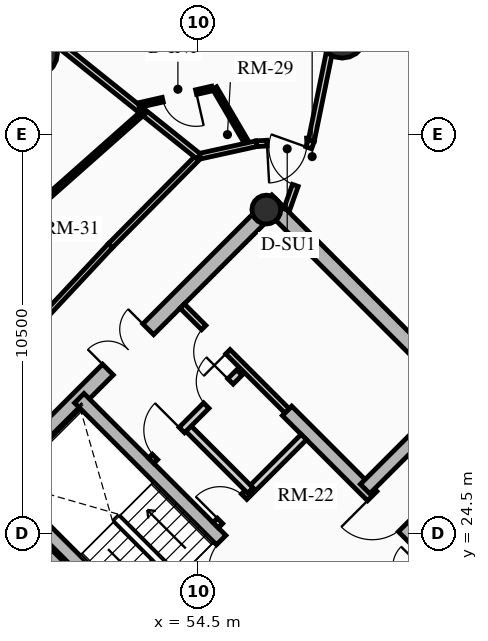
"""IFC4 building model, lengths in metres.
Left out: names, types, materials, properties, quantities, classifications, styles, units other than length and angle.
Written with IfcOpenShell. Run it as: python <this file> out.ifc"""

import sys

from ifc_helpers import new_model, si_unit, direction, frame, frame_2d, origin, origin_2d, place, context, subcontext, project, spatial, rectangle, circle, hollow_circle, extrude, source, transform, mapped, element, fill, save


model = new_model("IFC4")
c1 = context("Model", 3, precision=1e-05, world=origin(), true_north=direction((0.0, 1.0)))
c2 = subcontext(c1, "Body", "Model", "MODEL_VIEW")
j1 = project(units=[si_unit("LENGTHUNIT", "METRE"), si_unit("PLANEANGLEUNIT", "RADIAN")], contexts=[c1])
p1 = place(None, origin())
s1 = spatial("IfcSite", under=j1, at=p1, CompositionType="ELEMENT")
p2 = place(p1, origin())
s2 = spatial("IfcBuilding", under=s1, at=p2, CompositionType="ELEMENT")
p3 = place(p2, frame((0.0, 0.0, 174.88)))
s3 = spatial("IfcBuildingStorey", under=s2, at=p3, CompositionType="ELEMENT", Elevation=174.88)
for number, where, z_axis, x_axis in (
    (1, (58.702, 15.732, 0.0), (0.0, 0.0, 1.0), (-0.707, 0.707, 0.0)),
    (2, (66.268, 23.298, 0.0), (0.0, 0.0, 1.0), (-0.707, 0.707, 0.0)),
):
    element("IfcWall", number, at=place(p3, frame(where, z_axis=z_axis, x_axis=x_axis)), inside=s3, PredefinedType="SHEAR", context=c2, shape_type="SweptSolid", body=[
        extrude(rectangle(XDim=14.1, YDim=0.4, at=frame_2d((7.05, 0.0))), origin(), (0.0, 0.0, 1.0), 2.91),
    ])
p4 = place(p3, frame((48.873, 25.561, 0.0), z_axis=(0.0, 0.0, 1.0), x_axis=(0.707106781187, 0.707106781187, 0.0)))
e3 = element("IfcWall", 3, at=p4, inside=s3, PredefinedType="SHEAR", context=c2, shape_type="SweptSolid", body=[
    extrude(rectangle(XDim=10.7, YDim=0.4, at=frame_2d((5.35, 0.0))), origin(), (0.0, 0.0, 1.0), 2.91),
])
m1 = source(origin(), c2, "Body", "SweptSolid", [
    extrude(rectangle(XDim=1.5, YDim=2.02, at=frame_2d((0.75, 1.01))), frame((0.0, 0.21, 0.0), z_axis=(0.0, -1.0, 0.0), x_axis=(1.0, 0.0, 0.0)), (0.0, 0.0, 1.0), 0.42),
])
p5 = place(p4, frame((4.6, 0.0, 0.0)))
e4 = element("IfcOpeningElement", 4, at=p5, cuts=e3, PredefinedType="OPENING", context=c2, shape_type="MappedRepresentation", body=[
    mapped(m1, transform((0.0, 0.0, 0.0), x_axis=(1.0, 0.0, 0.0), y_axis=(0.0, 1.0, 0.0), z_axis=(0.0, 0.0, 1.0), scale=1.0)),
])
p6 = place(p3, frame((61.06, 18.373, 0.0), z_axis=(0.0, 0.0, 1.0), x_axis=(-0.707106781187, 0.707106781187, 0.0)))
e5 = element("IfcWall", 5, at=p6, inside=s3, PredefinedType="SHEAR", context=c2, shape_type="SweptSolid", body=[
    extrude(rectangle(XDim=13.7, YDim=0.35, at=frame_2d((6.85, 0.0))), origin(), (0.0, 0.0, 1.0), 2.91),
])
m2 = source(origin(), c2, "Body", "SweptSolid", [
    extrude(rectangle(XDim=1.1, YDim=2.015, at=frame_2d((0.55, 1.007))), frame((0.0, 0.185, 0.0), z_axis=(0.0, -1.0, 0.0), x_axis=(1.0, 0.0, 0.0)), (0.0, 0.0, 1.0), 0.37),
])
p7 = place(p6, frame((4.85, 0.0, 0.0)))
e6 = element("IfcOpeningElement", 6, at=p7, cuts=e5, PredefinedType="OPENING", context=c2, shape_type="MappedRepresentation", body=[
    mapped(m2, transform((0.0, 0.0, 0.0), x_axis=(1.0, 0.0, 0.0), y_axis=(0.0, 1.0, 0.0), z_axis=(0.0, 0.0, 1.0), scale=1.0)),
])
p8 = place(p6, frame((0.625, 0.0, 0.0)))
e7 = element("IfcOpeningElement", 7, at=p8, cuts=e5, PredefinedType="OPENING", context=c2, shape_type="MappedRepresentation", body=[
    mapped(m2, transform((0.0, 0.0, 0.0), x_axis=(1.0, 0.0, 0.0), y_axis=(0.0, 1.0, 0.0), z_axis=(0.0, 0.0, 1.0), scale=1.0)),
])
p9 = place(p6, frame((2.625, 0.0, 0.0)))
e8 = element("IfcOpeningElement", 8, at=p9, cuts=e5, PredefinedType="OPENING", context=c2, shape_type="MappedRepresentation", body=[
    mapped(m2, transform((0.0, 0.0, 0.0), x_axis=(1.0, 0.0, 0.0), y_axis=(0.0, 1.0, 0.0), z_axis=(0.0, 0.0, 1.0), scale=1.0)),
])
m3 = source(origin(), c2, "Body", "SweptSolid", [
    extrude(rectangle(XDim=1.15, YDim=2.02, at=frame_2d((0.575, 1.01))), frame((0.0, 0.185, 0.0), z_axis=(0.0, -1.0, 0.0), x_axis=(1.0, 0.0, 0.0)), (0.0, 0.0, 1.0), 0.37),
])
p10 = place(p6, frame((7.27, 0.0, 0.0)))
e9 = element("IfcOpeningElement", 9, at=p10, cuts=e5, PredefinedType="OPENING", context=c2, shape_type="MappedRepresentation", body=[
    mapped(m3, transform((0.0, 0.0, 0.0), x_axis=(1.0, 0.0, 0.0), y_axis=(0.0, 1.0, 0.0), z_axis=(0.0, 0.0, 1.0), scale=1.0)),
])
p11 = place(p3, frame((63.627, 20.94, 0.0), z_axis=(0.0, 0.0, 1.0), x_axis=(-0.707119496762, 0.707094065383, 0.0)))
e10 = element("IfcWall", 10, at=p11, inside=s3, PredefinedType="SHEAR", context=c2, shape_type="SweptSolid", body=[
    extrude(rectangle(XDim=9.6, YDim=0.35, at=frame_2d((4.8, 0.0))), origin(), (0.0, 0.0, 1.0), 2.91),
])
p12 = place(p11, frame((5.28, 0.0, 0.0)))
e11 = element("IfcOpeningElement", 11, at=p12, cuts=e10, PredefinedType="OPENING", context=c2, shape_type="MappedRepresentation", body=[
    mapped(m3, transform((0.0, 0.0, 0.0), x_axis=(1.0, 0.0, 0.0), y_axis=(0.0, 1.0, 0.0), z_axis=(0.0, 0.0, 1.0), scale=1.0)),
])
p13 = place(p3, frame((53.922, 21.141, 0.0), z_axis=(0.0, 0.0, 1.0), x_axis=(-0.707106781187, 0.707106781187, 0.0)))
e12 = element("IfcWall", 12, at=p13, inside=s3, PredefinedType="SHEAR", context=c2, shape_type="SweptSolid", body=[
    extrude(rectangle(XDim=6.695, YDim=0.35, at=frame_2d((3.348, 0.0))), origin(), (0.0, 0.0, 1.0), 2.91),
])
p14 = place(p3, frame((58.893, 25.674, 0.0), z_axis=(0.0, 0.0, 1.0), x_axis=(0.707106781187, 0.707106781187, 0.0)))
e13 = element("IfcWall", 13, at=p14, inside=s3, PredefinedType="SHEAR", context=c2, shape_type="SweptSolid", body=[
    extrude(rectangle(XDim=3.285, YDim=0.35, at=frame_2d((1.643, 0.0))), origin(), (0.0, 0.0, 1.0), 2.91),
])
p15 = place(p3, frame((56.294, 33.024, 0.0), z_axis=(0.0, 0.0, 1.0), x_axis=(0.707106781187, 0.707106781187, 0.0)))
e14 = element("IfcColumn", 14, at=p15, inside=s3, PredefinedType="COLUMN", context=c2, shape_type="SweptSolid", body=[
    extrude(hollow_circle(Radius=0.38, WallThickness=0.032, at=origin_2d()), origin(), (0.0, 0.0, 1.0), 2.91),
])
for number, where, z_axis, x_axis in (
    (15, (58.291, 37.635, 0.0), (0.0, 0.0, 1.0), (1.0, 0.0, 0.0)),
    (16, (50.173, 37.146, 0.0), (0.0, 0.0, 1.0), (1.0, 0.0, 0.0)),
):
    element("IfcColumn", number, at=place(p3, frame(where, z_axis=z_axis, x_axis=x_axis)), inside=s3, PredefinedType="USERDEFINED", context=c2, shape_type="SweptSolid", body=[
        extrude(circle(Radius=0.625, at=origin_2d()), origin(), (0.0, 0.0, 1.0), 2.91),
    ])
p16 = place(p3, frame((58.214, 21.467, 0.0), z_axis=(0.0, 0.0, 1.0), x_axis=(0.707106781187, 0.707106781187, 0.0)))
e17 = element("IfcWall", 17, at=p16, inside=s3, PredefinedType="PARTITIONING", context=c2, shape_type="SweptSolid", body=[
    extrude(rectangle(XDim=3.28, YDim=0.2, at=frame_2d((1.64, 0.0))), origin(), (0.0, 0.0, 1.0), 2.675),
])
m4 = source(origin(), c2, "Body", "SweptSolid", [
    extrude(rectangle(XDim=1.5, YDim=2.02, at=frame_2d((0.75, 1.01))), frame((0.0, 0.11, 0.0), z_axis=(0.0, -1.0, 0.0), x_axis=(1.0, 0.0, 0.0)), (0.0, 0.0, 1.0), 0.22),
])
p17 = place(p16, frame((1.55, 0.0, 0.0)))
e18 = element("IfcOpeningElement", 18, at=p17, cuts=e17, PredefinedType="OPENING", context=c2, shape_type="MappedRepresentation", body=[
    mapped(m4, transform((0.0, 0.0, 0.0), x_axis=(1.0, 0.0, 0.0), y_axis=(0.0, 1.0, 0.0), z_axis=(0.0, 0.0, 1.0), scale=1.0)),
])
p18 = place(p3, frame((54.961, 24.719, 0.0), z_axis=(0.0, 0.0, 1.0), x_axis=(0.707106781187, 0.707106781187, 0.0)))
e19 = element("IfcWall", 19, at=p18, inside=s3, PredefinedType="PARTITIONING", context=c2, shape_type="SweptSolid", body=[
    extrude(rectangle(XDim=3.28, YDim=0.2, at=frame_2d((1.64, 0.0))), origin(), (0.0, 0.0, 1.0), 2.675),
])
m5 = source(origin(), c2, "Body", "SweptSolid", [
    extrude(rectangle(XDim=0.9, YDim=2.005, at=frame_2d((0.45, 1.002))), frame((0.0, 0.11, 0.0), z_axis=(0.0, -1.0, 0.0), x_axis=(1.0, 0.0, 0.0)), (0.0, 0.0, 1.0), 0.22),
])
p19 = place(p18, frame((0.16, 0.0, 0.0)))
e20 = element("IfcOpeningElement", 20, at=p19, cuts=e19, PredefinedType="OPENING", context=c2, shape_type="MappedRepresentation", body=[
    mapped(m5, transform((0.0, 0.0, 0.0), x_axis=(1.0, 0.0, 0.0), y_axis=(0.0, 1.0, 0.0), z_axis=(0.0, 0.0, 1.0), scale=1.0)),
])
p20 = place(p3, frame((55.874, 25.631, 0.0), z_axis=(0.0, 0.0, 1.0), x_axis=(-0.707157639372, 0.707055919343, 0.0)))
e21 = element("IfcWall", 21, at=p20, inside=s3, PredefinedType="PARTITIONING", context=c2, shape_type="SweptSolid", body=[
    extrude(rectangle(XDim=2.4, YDim=0.2, at=frame_2d((1.2, 0.0))), origin(), (0.0, 0.0, 1.0), 2.675),
])
p21 = place(p3, frame((53.264, 26.416, 0.0), z_axis=(0.0, 0.0, 1.0), x_axis=(0.707106781187, 0.707106781187, 0.0)))
e22 = element("IfcWall", 22, at=p21, inside=s3, PredefinedType="PARTITIONING", context=c2, shape_type="SweptSolid", body=[
    extrude(rectangle(XDim=3.28, YDim=0.2, at=frame_2d((1.64, 0.0))), origin(), (0.0, 0.0, 1.0), 2.675),
])
m6 = source(origin(), c2, "Body", "SweptSolid", [
    extrude(rectangle(XDim=1.0, YDim=2.015, at=frame_2d((0.5, 1.007))), frame((0.0, 0.11, 0.0), z_axis=(0.0, -1.0, 0.0), x_axis=(1.0, 0.0, 0.0)), (0.0, 0.0, 1.0), 0.22),
])
p22 = place(p21, frame((0.14, 0.0, 0.0)))
e23 = element("IfcOpeningElement", 23, at=p22, cuts=e22, PredefinedType="OPENING", context=c2, shape_type="MappedRepresentation", body=[
    mapped(m6, transform((0.0, 0.0, 0.0), x_axis=(1.0, 0.0, 0.0), y_axis=(0.0, 1.0, 0.0), z_axis=(0.0, 0.0, 1.0), scale=1.0)),
])
p23 = place(p21, frame((2.05, 0.0, 0.0)))
e24 = element("IfcOpeningElement", 24, at=p23, cuts=e22, PredefinedType="OPENING", context=c2, shape_type="MappedRepresentation", body=[
    mapped(m5, transform((0.0, 0.0, 0.0), x_axis=(1.0, 0.0, 0.0), y_axis=(0.0, 1.0, 0.0), z_axis=(0.0, 0.0, 1.0), scale=1.0)),
])
p24 = place(p3, frame((56.839, 27.728, 0.0), z_axis=(0.0, 0.0, 1.0), x_axis=(-0.707106781187, 0.707106781187, 0.0)))
e25 = element("IfcWall", 25, at=p24, inside=s3, PredefinedType="PARTITIONING", context=c2, shape_type="SweptSolid", body=[
    extrude(rectangle(XDim=3.9, YDim=0.16, at=frame_2d((1.95, 0.0))), origin(), (0.0, 0.0, 1.0), 2.675),
])
m7 = source(origin(), c2, "Body", "SweptSolid", [
    extrude(rectangle(XDim=0.9, YDim=2.005, at=frame_2d((0.45, 1.002))), frame((0.0, 0.09, 0.0), z_axis=(0.0, -1.0, 0.0), x_axis=(1.0, 0.0, 0.0)), (0.0, 0.0, 1.0), 0.18),
])
p25 = place(p24, frame((2.2, 0.0, 0.0)))
e26 = element("IfcOpeningElement", 26, at=p25, cuts=e25, PredefinedType="OPENING", context=c2, shape_type="MappedRepresentation", body=[
    mapped(m7, transform((0.0, 0.0, 0.0), x_axis=(1.0, 0.0, 0.0), y_axis=(0.0, 1.0, 0.0), z_axis=(0.0, 0.0, 1.0), scale=1.0)),
])
p26 = place(p3, frame((57.478, 34.838, 0.0), z_axis=(0.0, 0.0, 1.0), x_axis=(-0.998448388303, -0.05568497011, 0.0)))
e27 = element("IfcWall", 27, at=p26, inside=s3, PredefinedType="PARTITIONING", context=c2, shape_type="SweptSolid", body=[
    extrude(rectangle(XDim=1.447, YDim=0.15, at=frame_2d((0.723, 0.0))), origin(), (0.0, 0.0, 1.0), 2.245),
])
m8 = source(origin(), c2, "Body", "SweptSolid", [
    extrude(rectangle(XDim=1.05, YDim=2.015, at=frame_2d((0.525, 1.007))), frame((0.0, 0.085, 0.0), z_axis=(0.0, -1.0, 0.0), x_axis=(1.0, 0.0, 0.0)), (0.0, 0.0, 1.0), 0.17),
])
p27 = place(p26, frame((0.12, 0.0, 0.0)))
e28 = element("IfcOpeningElement", 28, at=p27, cuts=e27, PredefinedType="OPENING", context=c2, shape_type="MappedRepresentation", body=[
    mapped(m8, transform((0.0, 0.0, 0.0), x_axis=(1.0, 0.0, 0.0), y_axis=(0.0, 1.0, 0.0), z_axis=(0.0, 0.0, 1.0), scale=1.0)),
])
p28 = place(p3, frame((56.033, 34.757, 0.0), z_axis=(0.0, 0.0, 1.0), x_axis=(-0.976507263775, -0.215484486204, 0.0)))
e29 = element("IfcWall", 29, at=p28, inside=s3, PredefinedType="PARTITIONING", context=c2, shape_type="SweptSolid", body=[
    extrude(rectangle(XDim=1.556, YDim=0.15, at=frame_2d((0.778, 0.0))), origin(), (0.0, 0.0, 1.0), 2.245),
])
p29 = place(p3, frame((54.514, 34.422, 0.0), z_axis=(0.0, 0.0, 1.0), x_axis=(-0.703289573518, -0.710903492593, 0.0)))
e30 = element("IfcWall", 30, at=p29, inside=s3, PredefinedType="PARTITIONING", context=c2, shape_type="SweptSolid", body=[
    extrude(rectangle(XDim=3.303, YDim=0.15, at=frame_2d((1.651, 0.0))), origin(), (0.0, 0.0, 1.0), 2.245),
])
p30 = place(p3, frame((52.191, 32.074, 0.0), z_axis=(0.0, 0.0, 1.0), x_axis=(-0.682404362608, -0.730974887321, 0.0)))
e31 = element("IfcWall", 31, at=p30, inside=s3, PredefinedType="PARTITIONING", context=c2, shape_type="SweptSolid", body=[
    extrude(rectangle(XDim=6.364, YDim=0.15, at=frame_2d((3.182, 0.0))), origin(), (0.0, 0.0, 1.0), 2.245),
])
p31 = place(p3, frame((57.478, 34.838, 0.0), z_axis=(0.0, 0.0, 1.0), x_axis=(0.200272806445, 0.979740171167, 0.0)))
e32 = element("IfcWall", 32, at=p31, inside=s3, PredefinedType="PARTITIONING", context=c2, shape_type="SweptSolid", body=[
    extrude(rectangle(XDim=4.358, YDim=0.16, at=frame_2d((2.179, 0.0))), origin(), (0.0, 0.0, 1.0), 2.245),
])
p32 = place(p3, frame((54.514, 34.422, 0.0), z_axis=(0.0, 0.0, 1.0), x_axis=(-0.780385234796, 0.625299036712, 0.0)))
e33 = element("IfcWall", 33, at=p32, inside=s3, PredefinedType="PARTITIONING", context=c2, shape_type="SweptSolid", body=[
    extrude(rectangle(XDim=6.653, YDim=0.16, at=frame_2d((3.326, 0.0))), origin(), (0.0, 0.0, 1.0), 2.245),
])
p33 = place(p3, frame((56.828, 33.021, 0.0), z_axis=(0.0, 0.0, 1.0), x_axis=(0.336608838259, 0.941644566705, 0.0)))
e34 = element("IfcWall", 34, at=p33, inside=s3, PredefinedType="PARTITIONING", context=c2, shape_type="SweptSolid", body=[
    extrude(rectangle(XDim=1.93, YDim=0.16, at=frame_2d((0.965, 0.0))), origin(), (0.0, 0.0, 1.0), 2.245),
])
m9 = source(origin(), c2, "Body", "SweptSolid", [
    extrude(rectangle(XDim=1.05, YDim=2.015, at=frame_2d((0.525, 1.007))), frame((0.0, 0.09, 0.0), z_axis=(0.0, -1.0, 0.0), x_axis=(1.0, 0.0, 0.0)), (0.0, 0.0, 1.0), 0.18),
])
p34 = place(p33, frame((0.68, 0.0, 0.0)))
e35 = element("IfcOpeningElement", 35, at=p34, cuts=e34, PredefinedType="OPENING", context=c2, shape_type="MappedRepresentation", body=[
    mapped(m9, transform((0.0, 0.0, 0.0), x_axis=(1.0, 0.0, 0.0), y_axis=(0.0, 1.0, 0.0), z_axis=(0.0, 0.0, 1.0), scale=1.0)),
])
p35 = place(p3, frame((55.737, 34.853, 0.0), z_axis=(0.0, 0.0, 1.0), x_axis=(-0.506282425857, 0.862367732043, 0.0)))
e36 = element("IfcWall", 36, at=p35, inside=s3, PredefinedType="PARTITIONING", context=c2, shape_type="SweptSolid", body=[
    extrude(rectangle(XDim=1.591, YDim=0.125, at=frame_2d((0.796, 0.0))), origin(), (0.0, 0.0, 1.0), 2.245),
])
p36 = place(p3, frame((54.871, 36.211, 0.0), z_axis=(0.0, 0.0, 1.0), x_axis=(-0.975212623293, -0.221269833846, 0.0)))
e37 = element("IfcWall", 37, at=p36, inside=s3, PredefinedType="PARTITIONING", context=c2, shape_type="SweptSolid", body=[
    extrude(rectangle(XDim=1.983, YDim=0.125, at=frame_2d((0.991, 0.0))), origin(), (0.0, 0.0, 1.0), 2.312),
])
m10 = source(origin(), c2, "Body", "SweptSolid", [
    extrude(rectangle(XDim=0.9, YDim=2.005, at=frame_2d((0.45, 1.002))), frame((0.0, 0.073, 0.0), z_axis=(0.0, -1.0, 0.0), x_axis=(1.0, 0.0, 0.0)), (0.0, 0.0, 1.0), 0.145),
])
p37 = place(p36, frame((0.436, 0.0, 0.0)))
e38 = element("IfcOpeningElement", 38, at=p37, cuts=e37, PredefinedType="OPENING", context=c2, shape_type="MappedRepresentation", body=[
    mapped(m10, transform((0.0, 0.0, 0.0), x_axis=(1.0, 0.0, 0.0), y_axis=(0.0, 1.0, 0.0), z_axis=(0.0, 0.0, 1.0), scale=1.0)),
])
p38 = place(p3, frame((53.06, 35.587, 0.0), z_axis=(0.0, 0.0, 1.0), x_axis=(-0.748390346028, -0.663258539314, 0.0)))
e39 = element("IfcWall", 39, at=p38, inside=s3, PredefinedType="PARTITIONING", context=c2, shape_type="SweptSolid", body=[
    extrude(rectangle(XDim=3.553, YDim=0.125, at=frame_2d((1.777, 0.0))), origin(), (0.0, 0.0, 1.0), 2.245),
])
m11 = source(origin(), c2, "Body", "SweptSolid", [
    extrude(rectangle(XDim=1.15, YDim=2.02, at=frame_2d((0.575, 1.01))), frame((0.0, 0.025, 0.0), z_axis=(0.0, -1.0, 0.0), x_axis=(1.0, 0.0, 0.0)), (0.0, 0.0, 1.0), 0.05),
])
p39 = place(p10, origin())
e40 = element("IfcDoor", 40, at=p39, inside=s3, OperationType="SINGLE_SWING_LEFT", PredefinedType="DOOR", context=c2, shape_type="MappedRepresentation", body=[
    mapped(m11, transform((0.0, 0.0, 0.0), x_axis=(1.0, 0.0, 0.0), y_axis=(0.0, 1.0, 0.0), z_axis=(0.0, 0.0, 1.0), scale=1.0)),
])
fill(e9, e40)
p40 = place(p12, origin())
e41 = element("IfcDoor", 41, at=p40, inside=s3, OperationType="SINGLE_SWING_RIGHT", PredefinedType="DOOR", context=c2, shape_type="MappedRepresentation", body=[
    mapped(m11, transform((0.0, 0.0, 0.0), x_axis=(1.0, 0.0, 0.0), y_axis=(0.0, 1.0, 0.0), z_axis=(0.0, 0.0, 1.0), scale=1.0)),
])
fill(e11, e41)
m12 = source(origin(), c2, "Body", "SweptSolid", [
    extrude(rectangle(XDim=1.5, YDim=2.02, at=frame_2d((0.75, 1.01))), frame((0.0, 0.025, 0.0), z_axis=(0.0, -1.0, 0.0), x_axis=(1.0, 0.0, 0.0)), (0.0, 0.0, 1.0), 0.05),
])
p41 = place(p5, origin())
e42 = element("IfcDoor", 42, at=p41, inside=s3, OperationType="DOUBLE_DOOR_SINGLE_SWING", PredefinedType="DOOR", context=c2, shape_type="MappedRepresentation", body=[
    mapped(m12, transform((0.0, 0.0, 0.0), x_axis=(1.0, 0.0, 0.0), y_axis=(0.0, 1.0, 0.0), z_axis=(0.0, 0.0, 1.0), scale=1.0)),
])
fill(e4, e42)
m13 = source(origin(), c2, "Body", "SweptSolid", [
    extrude(rectangle(XDim=0.9, YDim=2.005, at=frame_2d((0.45, 1.002))), frame((0.0, 0.025, 0.0), z_axis=(0.0, -1.0, 0.0), x_axis=(1.0, 0.0, 0.0)), (0.0, 0.0, 1.0), 0.05),
])
p42 = place(p19, origin())
e43 = element("IfcDoor", 43, at=p42, inside=s3, OperationType="SINGLE_SWING_LEFT", PredefinedType="DOOR", context=c2, shape_type="MappedRepresentation", body=[
    mapped(m13, transform((0.0, 0.0, 0.0), x_axis=(1.0, 0.0, 0.0), y_axis=(0.0, 1.0, 0.0), z_axis=(0.0, 0.0, 1.0), scale=1.0)),
])
fill(e20, e43)
m14 = source(origin(), c2, "Body", "SweptSolid", [
    extrude(rectangle(XDim=1.0, YDim=2.015, at=frame_2d((0.5, 1.007))), frame((0.0, 0.025, 0.0), z_axis=(0.0, -1.0, 0.0), x_axis=(1.0, 0.0, 0.0)), (0.0, 0.0, 1.0), 0.05),
])
p43 = place(p22, origin())
e44 = element("IfcDoor", 44, at=p43, inside=s3, OperationType="SINGLE_SWING_RIGHT", PredefinedType="DOOR", context=c2, shape_type="MappedRepresentation", body=[
    mapped(m14, transform((0.0, 0.0, 0.0), x_axis=(1.0, 0.0, 0.0), y_axis=(0.0, 1.0, 0.0), z_axis=(0.0, 0.0, 1.0), scale=1.0)),
])
fill(e23, e44)
p44 = place(p23, origin())
e45 = element("IfcDoor", 45, at=p44, inside=s3, OperationType="SINGLE_SWING_RIGHT", PredefinedType="DOOR", context=c2, shape_type="MappedRepresentation", body=[
    mapped(m13, transform((0.0, 0.0, 0.0), x_axis=(1.0, 0.0, 0.0), y_axis=(0.0, 1.0, 0.0), z_axis=(0.0, 0.0, 1.0), scale=1.0)),
])
fill(e24, e45)
p45 = place(p25, origin())
e46 = element("IfcDoor", 46, at=p45, inside=s3, OperationType="SINGLE_SWING_LEFT", PredefinedType="DOOR", context=c2, shape_type="MappedRepresentation", body=[
    mapped(m13, transform((0.0, 0.0, 0.0), x_axis=(1.0, 0.0, 0.0), y_axis=(0.0, 1.0, 0.0), z_axis=(0.0, 0.0, 1.0), scale=1.0)),
])
fill(e26, e46)
m15 = source(origin(), c2, "Body", "SweptSolid", [
    extrude(rectangle(XDim=1.05, YDim=2.015, at=frame_2d((0.525, 1.007))), frame((0.0, 0.025, 0.0), z_axis=(0.0, -1.0, 0.0), x_axis=(1.0, 0.0, 0.0)), (0.0, 0.0, 1.0), 0.05),
])
p46 = place(p34, origin())
e47 = element("IfcDoor", 47, at=p46, inside=s3, OperationType="SINGLE_SWING_RIGHT", PredefinedType="DOOR", context=c2, shape_type="MappedRepresentation", body=[
    mapped(m15, transform((0.0, 0.0, 0.0), x_axis=(1.0, 0.0, 0.0), y_axis=(0.0, 1.0, 0.0), z_axis=(0.0, 0.0, 1.0), scale=1.0)),
])
fill(e35, e47)
p47 = place(p27, origin())
e48 = element("IfcDoor", 48, at=p47, inside=s3, OperationType="SINGLE_SWING_RIGHT", PredefinedType="DOOR", context=c2, shape_type="MappedRepresentation", body=[
    mapped(m15, transform((0.0, 0.0, 0.0), x_axis=(1.0, 0.0, 0.0), y_axis=(0.0, 1.0, 0.0), z_axis=(0.0, 0.0, 1.0), scale=1.0)),
])
fill(e28, e48)
p48 = place(p37, origin())
e49 = element("IfcDoor", 49, at=p48, inside=s3, OperationType="SINGLE_SWING_LEFT", PredefinedType="DOOR", context=c2, shape_type="MappedRepresentation", body=[
    mapped(m13, transform((0.0, 0.0, 0.0), x_axis=(1.0, 0.0, 0.0), y_axis=(0.0, 1.0, 0.0), z_axis=(0.0, 0.0, 1.0), scale=1.0)),
])
fill(e38, e49)
save(model, sys.argv[1])
